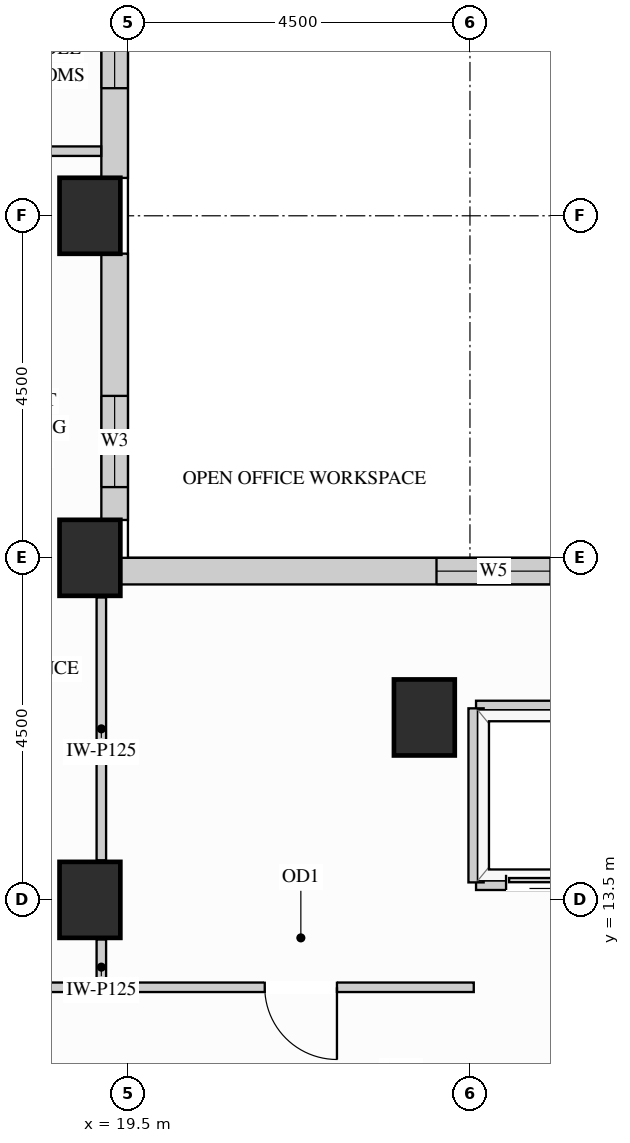
"""IFC4 building model, lengths in metres.
Left out: names, types, materials, properties, quantities, classifications, styles, units other than length and angle.
Written with IfcOpenShell. Run it as: python <this file> out.ifc"""

import sys

from ifc_helpers import new_model, si_unit, direction, frame, frame_2d, origin, origin_2d, place, context, subcontext, project, spatial, rectangle, extrude, source, transform, mapped, element, fill, save


model = new_model("IFC4")
c1 = context("Model", 3, precision=1e-05, world=origin(), true_north=direction((0.0, 1.0)))
c2 = subcontext(c1, "Body", "Model", "MODEL_VIEW")
j1 = project(units=[si_unit("LENGTHUNIT", "METRE"), si_unit("PLANEANGLEUNIT", "RADIAN")], contexts=[c1])
p1 = place(None, origin())
s1 = spatial("IfcSite", under=j1, at=p1, CompositionType="ELEMENT")
p2 = place(p1, origin())
s2 = spatial("IfcBuilding", under=s1, at=p2, CompositionType="ELEMENT")
p3 = place(p2, frame((0.0, 0.0, 146.7)))
s3 = spatial("IfcBuildingStorey", under=s2, at=p3, CompositionType="ELEMENT", Elevation=146.7)
m1 = source(origin(), c2, "Body", "SweptSolid", [
    extrude(rectangle(XDim=0.8, YDim=1.0, at=origin_2d()), origin(), (0.0, 0.0, 1.0), 3.4),
])
for number, where, z_axis, x_axis in (
    (1, (19.0, 13.5, 0.0), (0.0, 0.0, 1.0), (1.0, 0.0, 0.0)),
    (2, (19.0, 18.0, 0.0), (0.0, 0.0, 1.0), (1.0, 0.0, 0.0)),
    (3, (19.0, 22.5, 0.0), (0.0, 0.0, 1.0), (1.0, 0.0, 0.0)),
    (4, (23.4, 15.9, 0.0), (0.0, 0.0, 1.0), (1.0, 0.0, 0.0)),
):
    element("IfcColumn", number, at=place(p3, frame(where, z_axis=z_axis, x_axis=x_axis)), inside=s3, PredefinedType="COLUMN", context=c2, shape_type="MappedRepresentation", body=[
        mapped(m1, transform((0.0, 0.0, 0.0), x_axis=(1.0, 0.0, 0.0), y_axis=(0.0, 1.0, 0.0), z_axis=(0.0, 0.0, 1.0))),
    ])
p4 = place(p3, frame((34.502, 17.825, 0.0), z_axis=(0.0, 0.0, 1.0), x_axis=(-1.0, 0.0, 0.0)))
e5 = element("IfcWall", 5, at=p4, inside=s3, PredefinedType="SOLIDWALL", context=c2, shape_type="SweptSolid", body=[
    extrude(rectangle(XDim=15.104, YDim=0.35, at=frame_2d((7.552, 0.0))), origin(), (0.0, 0.0, 1.0), 3.385),
])
p5 = place(p4, frame((4.131, 0.0, 0.78)))
e6 = element("IfcOpeningElement", 6, at=p5, cuts=e5, PredefinedType="OPENING", context=c2, shape_type="SweptSolid", body=[
    extrude(rectangle(XDim=1.5, YDim=2.0, at=frame_2d((0.75, 1.0))), frame((0.0, 0.185, 0.0), z_axis=(0.0, -1.0, 0.0), x_axis=(1.0, 0.0, 0.0)), (0.0, 0.0, 1.0), 0.37),
])
p6 = place(p4, frame((9.442, 0.0, 0.78)))
e7 = element("IfcOpeningElement", 7, at=p6, cuts=e5, PredefinedType="OPENING", context=c2, shape_type="SweptSolid", body=[
    extrude(rectangle(XDim=1.5, YDim=2.0, at=frame_2d((0.75, 1.0))), frame((0.0, 0.185, 0.0), z_axis=(0.0, -1.0, 0.0), x_axis=(1.0, 0.0, 0.0)), (0.0, 0.0, 1.0), 0.37),
])
p7 = place(p3, frame((19.325, 18.498, 0.0), z_axis=(0.0, 0.0, 1.0), x_axis=(0.0, 1.0, 0.0)))
e8 = element("IfcWall", 8, at=p7, inside=s3, PredefinedType="SOLIDWALL", context=c2, shape_type="SweptSolid", body=[
    extrude(rectangle(XDim=3.504, YDim=0.35, at=frame_2d((1.752, 0.0))), origin(), (0.0, 0.0, 1.0), 2.612),
])
p8 = place(p7, frame((0.433, 0.0, 0.78)))
e9 = element("IfcOpeningElement", 9, at=p8, cuts=e8, PredefinedType="OPENING", context=c2, shape_type="SweptSolid", body=[
    extrude(rectangle(XDim=1.2, YDim=1.652, at=frame_2d((0.6, 0.826))), frame((0.0, 0.185, 0.0), z_axis=(0.0, -1.0, 0.0), x_axis=(1.0, 0.0, 0.0)), (0.0, 0.0, 1.0), 0.37),
])
p9 = place(p3, frame((19.325, 22.998, 0.0), z_axis=(0.0, 0.0, 1.0), x_axis=(0.0, 1.0, 0.0)))
e10 = element("IfcWall", 10, at=p9, inside=s3, PredefinedType="SOLIDWALL", context=c2, shape_type="SweptSolid", body=[
    extrude(rectangle(XDim=3.304, YDim=0.35, at=frame_2d((1.652, 0.0))), origin(), (0.0, 0.0, 1.0), 2.612),
])
p10 = place(p9, frame((1.18, 0.0, 0.78)))
e11 = element("IfcOpeningElement", 11, at=p10, cuts=e10, PredefinedType="OPENING", context=c2, shape_type="SweptSolid", body=[
    extrude(rectangle(XDim=1.5, YDim=1.652, at=frame_2d((0.75, 0.826))), frame((0.0, 0.185, 0.0), z_axis=(0.0, -1.0, 0.0), x_axis=(1.0, 0.0, 0.0)), (0.0, 0.0, 1.0), 0.37),
])
m2 = source(origin(), c2, "Body", "SweptSolid", [
    extrude(rectangle(XDim=2.598, YDim=0.125, at=frame_2d((1.299, 0.0))), origin(), (0.0, 0.0, 1.0), 3.385),
])
p11 = place(p3, frame((16.55, 23.35, 0.0), z_axis=(0.0, 0.0, 1.0), x_axis=(1.0, 0.0, 0.0)))
e12 = element("IfcWall", 12, at=p11, inside=s3, PredefinedType="PARTITIONING", context=c2, shape_type="MappedRepresentation", body=[
    mapped(m2, transform((0.0, 0.0, 0.0), x_axis=(1.0, 0.0, 0.0), y_axis=(0.0, 1.0, 0.0), z_axis=(0.0, 0.0, 1.0))),
])
m3 = source(origin(), c2, "Body", "SweptSolid", [
    extrude(rectangle(XDim=0.63, YDim=0.125, at=frame_2d((0.315, 0.0))), origin(), (0.0, 0.0, 1.0), 2.773),
])
p12 = place(p3, frame((19.15, 12.35, 0.0), z_axis=(0.0, 0.0, 1.0), x_axis=(0.0, 1.0, 0.0)))
e13 = element("IfcWall", 13, at=p12, inside=s3, PredefinedType="PARTITIONING", context=c2, shape_type="MappedRepresentation", body=[
    mapped(m3, transform((0.0, 0.0, 0.0), x_axis=(1.0, 0.0, 0.0), y_axis=(0.0, 1.0, 0.0), z_axis=(0.0, 0.0, 1.0))),
])
m4 = source(origin(), c2, "Body", "SweptSolid", [
    extrude(rectangle(XDim=3.46, YDim=0.125, at=frame_2d((1.73, 0.0))), origin(), (0.0, 0.0, 1.0), 2.773),
])
p13 = place(p3, frame((19.15, 14.02, 0.0), z_axis=(0.0, 0.0, 1.0), x_axis=(0.0, 1.0, 0.0)))
e14 = element("IfcWall", 14, at=p13, inside=s3, PredefinedType="PARTITIONING", context=c2, shape_type="MappedRepresentation", body=[
    mapped(m4, transform((0.0, 0.0, 0.0), x_axis=(1.0, 0.0, 0.0), y_axis=(0.0, 1.0, 0.0), z_axis=(0.0, 0.0, 1.0))),
])
m5 = source(origin(), c2, "Body", "SweptSolid", [
    extrude(rectangle(XDim=2.95, YDim=0.125, at=frame_2d((1.475, 0.0))), origin(), (0.0, 0.0, 1.0), 3.385),
])
p14 = place(p3, frame((16.55, 12.35, 0.0), z_axis=(0.0, 0.0, 1.0), x_axis=(1.0, 0.0, 0.0)))
e15 = element("IfcWall", 15, at=p14, inside=s3, PredefinedType="PARTITIONING", context=c2, shape_type="MappedRepresentation", body=[
    mapped(m5, transform((0.0, 0.0, 0.0), x_axis=(1.0, 0.0, 0.0), y_axis=(0.0, 1.0, 0.0), z_axis=(0.0, 0.0, 1.0))),
])
p15 = place(p3, frame((19.5, 12.35, 0.0), z_axis=(0.0, 0.0, 1.0), x_axis=(1.0, 0.0, 0.0)))
e16 = element("IfcWall", 16, at=p15, inside=s3, PredefinedType="PARTITIONING", context=c2, shape_type="SweptSolid", body=[
    extrude(rectangle(XDim=4.55, YDim=0.125, at=frame_2d((2.275, 0.0))), origin(), (0.0, 0.0, 1.0), 3.385),
])
p16 = place(p15, frame((1.8, 0.0, 0.0)))
e17 = element("IfcOpeningElement", 17, at=p16, cuts=e16, PredefinedType="OPENING", context=c2, shape_type="SweptSolid", body=[
    extrude(rectangle(XDim=0.95, YDim=2.15, at=frame_2d((0.475, 1.075))), frame((0.0, 0.073, 0.0), z_axis=(0.0, -1.0, 0.0), x_axis=(1.0, 0.0, 0.0)), (0.0, 0.0, 1.0), 0.145),
])
m6 = source(origin(), c2, "Body", "SweptSolid", [
    extrude(rectangle(XDim=1.89, YDim=0.2, at=frame_2d((0.945, 0.0))), origin(), (0.0, 0.0, 1.0), 2.773),
])
p17 = place(p3, frame((24.08, 16.02, 0.0), z_axis=(0.0, 0.0, 1.0), x_axis=(1.0, 0.0, 0.0)))
e18 = element("IfcWall", 18, at=p17, inside=s3, PredefinedType="PARTITIONING", context=c2, shape_type="MappedRepresentation", body=[
    mapped(m6, transform((0.0, 0.0, 0.0), x_axis=(1.0, 0.0, 0.0), y_axis=(0.0, 1.0, 0.0), z_axis=(0.0, 0.0, 1.0))),
])
p18 = place(p3, frame((24.08, 13.73, 0.0), z_axis=(0.0, 0.0, 1.0), x_axis=(1.0, 0.0, 0.0)))
e19 = element("IfcWall", 19, at=p18, inside=s3, PredefinedType="PARTITIONING", context=c2, shape_type="SweptSolid", body=[
    extrude(rectangle(XDim=1.89, YDim=0.2, at=frame_2d((0.945, 0.0))), origin(), (0.0, 0.0, 1.0), 2.466),
])
p19 = place(p18, frame((0.395, 0.0, 0.0)))
e20 = element("IfcOpeningElement", 20, at=p19, cuts=e19, PredefinedType="OPENING", context=c2, shape_type="SweptSolid", body=[
    extrude(rectangle(XDim=1.1, YDim=2.2, at=frame_2d((0.55, 1.1))), frame((0.0, 0.11, 0.0), z_axis=(0.0, -1.0, 0.0), x_axis=(1.0, 0.0, 0.0)), (0.0, 0.0, 1.0), 0.22),
])
m7 = source(origin(), c2, "Body", "SweptSolid", [
    extrude(rectangle(XDim=2.29, YDim=0.2, at=frame_2d((1.145, 0.0))), origin(), (0.0, 0.0, 1.0), 3.385),
])
p20 = place(p3, frame((24.08, 13.73, 0.0), z_axis=(0.0, 0.0, 1.0), x_axis=(0.0, 1.0, 0.0)))
e21 = element("IfcWall", 21, at=p20, inside=s3, PredefinedType="PARTITIONING", context=c2, shape_type="MappedRepresentation", body=[
    mapped(m7, transform((0.0, 0.0, 0.0), x_axis=(1.0, 0.0, 0.0), y_axis=(0.0, 1.0, 0.0), z_axis=(0.0, 0.0, 1.0))),
])
m8 = source(origin(), c2, "Body", "SweptSolid", [
    extrude(rectangle(XDim=1.1, YDim=2.2, at=frame_2d((0.55, 1.1))), frame((0.0, 0.025, 0.0), z_axis=(0.0, -1.0, 0.0), x_axis=(1.0, 0.0, 0.0)), (0.0, 0.0, 1.0), 0.05),
])
p21 = place(p19, origin())
e22 = element("IfcDoor", 22, at=p21, inside=s3, OperationType="SLIDING_TO_LEFT", PredefinedType="DOOR", context=c2, shape_type="MappedRepresentation", body=[
    mapped(m8, transform((0.0, 0.0, 0.0), x_axis=(1.0, 0.0, 0.0), y_axis=(0.0, 1.0, 0.0), z_axis=(0.0, 0.0, 1.0))),
])
fill(e20, e22)
m9 = source(origin(), c2, "Body", "SweptSolid", [
    extrude(rectangle(XDim=0.95, YDim=2.15, at=frame_2d((0.475, 1.075))), frame((0.0, 0.025, 0.0), z_axis=(0.0, -1.0, 0.0), x_axis=(1.0, 0.0, 0.0)), (0.0, 0.0, 1.0), 0.05),
])
p22 = place(p16, origin())
e23 = element("IfcDoor", 23, at=p22, inside=s3, OperationType="SINGLE_SWING_RIGHT", PredefinedType="DOOR", context=c2, shape_type="MappedRepresentation", body=[
    mapped(m9, transform((0.0, 0.0, 0.0), x_axis=(1.0, 0.0, 0.0), y_axis=(0.0, 1.0, 0.0), z_axis=(0.0, 0.0, 1.0))),
])
fill(e17, e23)
m10 = source(origin(), c2, "Body", "SweptSolid", [
    extrude(rectangle(XDim=1.2, YDim=1.652, at=frame_2d((0.6, 0.826))), frame((0.0, 0.03, 0.0), z_axis=(0.0, -1.0, 0.0), x_axis=(1.0, 0.0, 0.0)), (0.0, 0.0, 1.0), 0.06),
])
p23 = place(p8, origin())
e24 = element("IfcWindow", 24, at=p23, inside=s3, PartitioningType="SINGLE_PANEL", PredefinedType="WINDOW", context=c2, shape_type="MappedRepresentation", body=[
    mapped(m10, transform((0.0, 0.0, 0.0), x_axis=(1.0, 0.0, 0.0), y_axis=(0.0, 1.0, 0.0), z_axis=(0.0, 0.0, 1.0))),
])
fill(e9, e24)
m11 = source(origin(), c2, "Body", "SweptSolid", [
    extrude(rectangle(XDim=1.5, YDim=2.0, at=frame_2d((0.75, 1.0))), frame((0.0, 0.03, 0.0), z_axis=(0.0, -1.0, 0.0), x_axis=(1.0, 0.0, 0.0)), (0.0, 0.0, 1.0), 0.06),
])
p24 = place(p6, origin())
e25 = element("IfcWindow", 25, at=p24, inside=s3, PartitioningType="SINGLE_PANEL", PredefinedType="WINDOW", context=c2, shape_type="MappedRepresentation", body=[
    mapped(m11, transform((0.0, 0.0, 0.0), x_axis=(1.0, 0.0, 0.0), y_axis=(0.0, 1.0, 0.0), z_axis=(0.0, 0.0, 1.0))),
])
fill(e7, e25)
m12 = source(origin(), c2, "Body", "SweptSolid", [
    extrude(rectangle(XDim=1.5, YDim=1.652, at=frame_2d((0.75, 0.826))), frame((0.0, 0.03, 0.0), z_axis=(0.0, -1.0, 0.0), x_axis=(1.0, 0.0, 0.0)), (0.0, 0.0, 1.0), 0.06),
])
p25 = place(p10, origin())
e26 = element("IfcWindow", 26, at=p25, inside=s3, PartitioningType="SINGLE_PANEL", PredefinedType="WINDOW", context=c2, shape_type="MappedRepresentation", body=[
    mapped(m12, transform((0.0, 0.0, 0.0), x_axis=(1.0, 0.0, 0.0), y_axis=(0.0, 1.0, 0.0), z_axis=(0.0, 0.0, 1.0))),
])
fill(e11, e26)
save(model, sys.argv[1])
